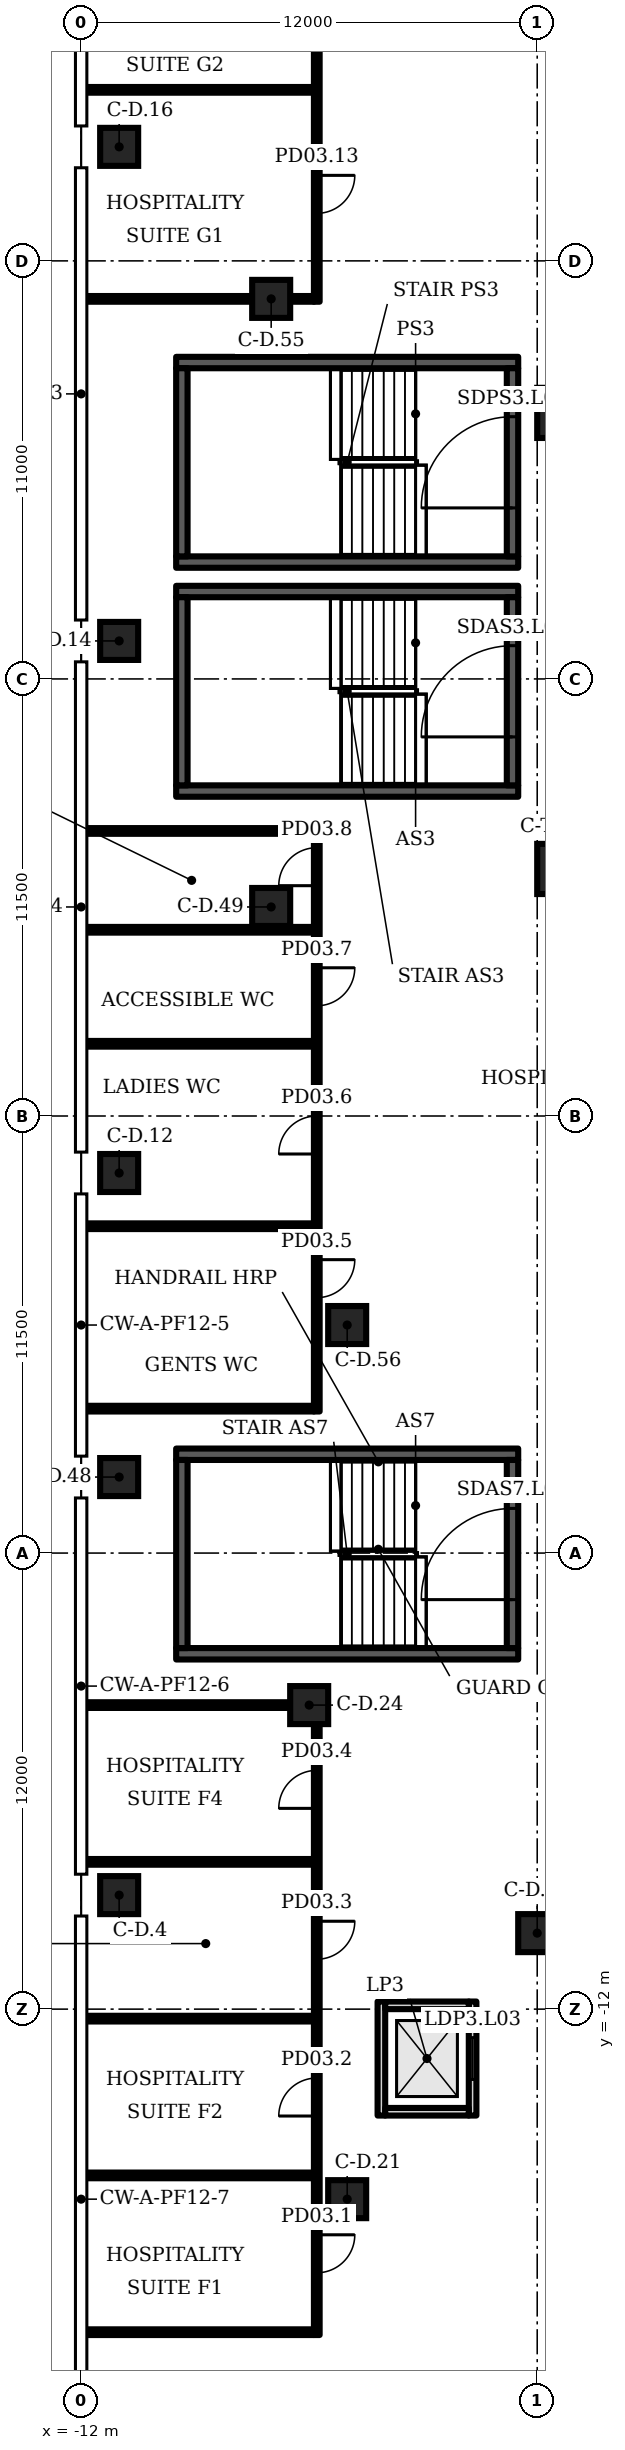
"""IFC4 building model, lengths in metres.
Left out: names, types, materials, properties, quantities, classifications, styles, units other than length and angle.
Written with IfcOpenShell. Run it as: python <this file> out.ifc"""

import sys

from ifc_helpers import new_model, si_unit, direction, frame, frame_2d, origin, origin_2d, place, context, subcontext, project, spatial, rectangle, extrude, element, fill, save


model = new_model("IFC4")
c1 = context("Model", 3, precision=1e-05, world=origin(), true_north=direction((0.0, 1.0)))
c2 = subcontext(c1, "Body", "Model", "MODEL_VIEW")
j1 = project(units=[si_unit("LENGTHUNIT", "METRE"), si_unit("PLANEANGLEUNIT", "RADIAN")], contexts=[c1])
p1 = place(None, origin())
s1 = spatial("IfcSite", under=j1, at=p1, CompositionType="ELEMENT")
p2 = place(p1, origin())
s2 = spatial("IfcBuilding", under=s1, at=p2, CompositionType="ELEMENT")
p3 = place(p2, frame((0.0, 0.0, 21.5)))
s3 = spatial("IfcBuildingStorey", under=s2, at=p3, CompositionType="ELEMENT", Elevation=21.5)
for number, where, z_axis, x_axis in (
    (1, (0.66, 30.0, 0.0), (0.0, 0.0, 1.0), (1.0, 0.0, 0.0)),
    (2, (0.66, 18.0, 0.0), (0.0, 0.0, 1.0), (1.0, 0.0, 0.0)),
):
    element("IfcColumn", number, at=place(p3, frame(where, z_axis=z_axis, x_axis=x_axis)), inside=s3, PredefinedType="COLUMN", context=c2, shape_type="SweptSolid", body=[
        extrude(rectangle(XDim=1.32, YDim=1.32, at=origin_2d()), origin(), (0.0, 0.0, 1.0), 6.0),
    ])
for number, where, z_axis, x_axis in (
    (3, (-11.0, -9.0, 0.0), (0.0, 0.0, 1.0), (1.0, 0.0, 0.0)),
    (4, (-11.0, 10.0, 0.0), (0.0, 0.0, 1.0), (1.0, 0.0, 0.0)),
    (5, (-11.0, 24.0, 0.0), (0.0, 0.0, 1.0), (1.0, 0.0, 0.0)),
    (6, (-11.0, 37.0, 0.0), (0.0, 0.0, 1.0), (1.0, 0.0, 0.0)),
    (7, (-5.0, -17.0, 0.0), (0.0, 0.0, 1.0), (1.0, 0.0, 0.0)),
    (8, (-6.0, -4.0, 0.0), (0.0, 0.0, 1.0), (1.0, 0.0, 0.0)),
    (9, (0.0, -10.0, 0.0), (0.0, 0.0, 1.0), (1.0, 0.0, 0.0)),
    (10, (-11.0, 2.0, 0.0), (0.0, 0.0, 1.0), (1.0, 0.0, 0.0)),
    (11, (-7.0, 17.0, 0.0), (0.0, 0.0, 1.0), (1.0, 0.0, 0.0)),
    (12, (-7.0, 33.0, 0.0), (0.0, 0.0, 1.0), (1.0, 0.0, 0.0)),
    (13, (-5.0, 6.0, 0.0), (0.0, 0.0, 1.0), (1.0, 0.0, 0.0)),
):
    element("IfcColumn", number, at=place(p3, frame(where, z_axis=z_axis, x_axis=x_axis)), inside=s3, PredefinedType="COLUMN", context=c2, shape_type="SweptSolid", body=[
        extrude(rectangle(XDim=1.0, YDim=1.0, at=origin_2d()), origin(), (0.0, 0.0, 1.0), 6.0),
    ])
p4 = place(p3, frame((-11.895, -20.5, 0.0), z_axis=(0.0, 0.0, 1.0), x_axis=(1.0, 0.0, 0.0)))
e14 = element("IfcWall", 14, at=p4, inside=s3, PredefinedType="PARTITIONING", context=c2, shape_type="SweptSolid", body=[
    extrude(rectangle(XDim=6.02, YDim=0.15, at=frame_2d((3.01, 0.0))), origin(), (0.0, 0.0, 1.0), 5.7),
])
p5 = place(p3, frame((-5.8, -20.575, 0.0), z_axis=(0.0, 0.0, 1.0), x_axis=(0.0, 1.0, 0.0)))
e15 = element("IfcWall", 15, at=p5, inside=s3, PredefinedType="PARTITIONING", context=c2, shape_type="SweptSolid", body=[
    extrude(rectangle(XDim=16.065, YDim=0.15, at=frame_2d((8.032, 0.0))), origin(), (0.0, 0.0, 1.0), 5.7),
])
p6 = place(p5, frame((1.637, 0.0, 0.0)))
e16 = element("IfcOpeningElement", 16, at=p6, cuts=e15, PredefinedType="OPENING", context=c2, shape_type="SweptSolid", body=[
    extrude(rectangle(XDim=1.0, YDim=2.1, at=frame_2d((0.5, 1.05))), frame((0.0, 0.085, 0.0), z_axis=(0.0, -1.0, 0.0), x_axis=(1.0, 0.0, 0.0)), (0.0, 0.0, 1.0), 0.17),
])
p7 = place(p5, frame((5.762, 0.0, 0.0)))
e17 = element("IfcOpeningElement", 17, at=p7, cuts=e15, PredefinedType="OPENING", context=c2, shape_type="SweptSolid", body=[
    extrude(rectangle(XDim=1.0, YDim=2.1, at=frame_2d((0.5, 1.05))), frame((0.0, 0.085, 0.0), z_axis=(0.0, -1.0, 0.0), x_axis=(1.0, 0.0, 0.0)), (0.0, 0.0, 1.0), 0.17),
])
p8 = place(p5, frame((9.887, 0.0, 0.0)))
e18 = element("IfcOpeningElement", 18, at=p8, cuts=e15, PredefinedType="OPENING", context=c2, shape_type="SweptSolid", body=[
    extrude(rectangle(XDim=1.0, YDim=2.1, at=frame_2d((0.5, 1.05))), frame((0.0, 0.085, 0.0), z_axis=(0.0, -1.0, 0.0), x_axis=(1.0, 0.0, 0.0)), (0.0, 0.0, 1.0), 0.17),
])
p9 = place(p5, frame((13.857, 0.0, 0.0)))
e19 = element("IfcOpeningElement", 19, at=p9, cuts=e15, PredefinedType="OPENING", context=c2, shape_type="SweptSolid", body=[
    extrude(rectangle(XDim=1.0, YDim=2.1, at=frame_2d((0.5, 1.05))), frame((0.0, 0.085, 0.0), z_axis=(0.0, -1.0, 0.0), x_axis=(1.0, 0.0, 0.0)), (0.0, 0.0, 1.0), 0.17),
])
p10 = place(p3, frame((-5.8, 3.725, 0.0), z_axis=(0.0, 0.0, 1.0), x_axis=(0.0, 1.0, 0.0)))
e20 = element("IfcWall", 20, at=p10, inside=s3, PredefinedType="PARTITIONING", context=c2, shape_type="SweptSolid", body=[
    extrude(rectangle(XDim=15.35, YDim=0.15, at=frame_2d((7.675, 0.0))), origin(), (0.0, 0.0, 1.0), 5.7),
])
p11 = place(p10, frame((2.995, 0.0, 0.0)))
e21 = element("IfcOpeningElement", 21, at=p11, cuts=e20, PredefinedType="OPENING", context=c2, shape_type="SweptSolid", body=[
    extrude(rectangle(XDim=1.0, YDim=2.1, at=frame_2d((0.5, 1.05))), frame((0.0, 0.085, 0.0), z_axis=(0.0, -1.0, 0.0), x_axis=(1.0, 0.0, 0.0)), (0.0, 0.0, 1.0), 0.17),
])
p12 = place(p10, frame((6.775, 0.0, 0.0)))
e22 = element("IfcOpeningElement", 22, at=p12, cuts=e20, PredefinedType="OPENING", context=c2, shape_type="SweptSolid", body=[
    extrude(rectangle(XDim=1.0, YDim=2.1, at=frame_2d((0.5, 1.05))), frame((0.0, 0.085, 0.0), z_axis=(0.0, -1.0, 0.0), x_axis=(1.0, 0.0, 0.0)), (0.0, 0.0, 1.0), 0.17),
])
p13 = place(p10, frame((10.675, 0.0, 0.0)))
e23 = element("IfcOpeningElement", 23, at=p13, cuts=e20, PredefinedType="OPENING", context=c2, shape_type="SweptSolid", body=[
    extrude(rectangle(XDim=1.0, YDim=2.1, at=frame_2d((0.5, 1.05))), frame((0.0, 0.085, 0.0), z_axis=(0.0, -1.0, 0.0), x_axis=(1.0, 0.0, 0.0)), (0.0, 0.0, 1.0), 0.17),
])
p14 = place(p10, frame((13.835, 0.0, 0.0)))
e24 = element("IfcOpeningElement", 24, at=p14, cuts=e20, PredefinedType="OPENING", context=c2, shape_type="SweptSolid", body=[
    extrude(rectangle(XDim=1.0, YDim=2.1, at=frame_2d((0.5, 1.05))), frame((0.0, 0.085, 0.0), z_axis=(0.0, -1.0, 0.0), x_axis=(1.0, 0.0, 0.0)), (0.0, 0.0, 1.0), 0.17),
])
p15 = place(p3, frame((-5.8, 32.925, 0.0), z_axis=(0.0, 0.0, 1.0), x_axis=(0.0, 1.0, 0.0)))
e25 = element("IfcWall", 25, at=p15, inside=s3, PredefinedType="PARTITIONING", context=c2, shape_type="SweptSolid", body=[
    extrude(rectangle(XDim=16.65, YDim=0.15, at=frame_2d((8.325, 0.0))), origin(), (0.0, 0.0, 1.0), 5.7),
])
p16 = place(p15, frame((2.325, 0.0, 0.0)))
e26 = element("IfcOpeningElement", 26, at=p16, cuts=e25, PredefinedType="OPENING", context=c2, shape_type="SweptSolid", body=[
    extrude(rectangle(XDim=1.0, YDim=2.1, at=frame_2d((0.5, 1.05))), frame((0.0, 0.085, 0.0), z_axis=(0.0, -1.0, 0.0), x_axis=(1.0, 0.0, 0.0)), (0.0, 0.0, 1.0), 0.17),
])
p17 = place(p15, frame((7.825, 0.0, 0.0)))
e27 = element("IfcOpeningElement", 27, at=p17, cuts=e25, PredefinedType="OPENING", context=c2, shape_type="SweptSolid", body=[
    extrude(rectangle(XDim=1.0, YDim=2.1, at=frame_2d((0.5, 1.05))), frame((0.0, 0.085, 0.0), z_axis=(0.0, -1.0, 0.0), x_axis=(1.0, 0.0, 0.0)), (0.0, 0.0, 1.0), 0.17),
])
p18 = place(p15, frame((13.325, 0.0, 0.0)))
e28 = element("IfcOpeningElement", 28, at=p18, cuts=e25, PredefinedType="OPENING", context=c2, shape_type="SweptSolid", body=[
    extrude(rectangle(XDim=1.0, YDim=2.1, at=frame_2d((0.5, 1.05))), frame((0.0, 0.085, 0.0), z_axis=(0.0, -1.0, 0.0), x_axis=(1.0, 0.0, 0.0)), (0.0, 0.0, 1.0), 0.17),
])
for number, where, z_axis, x_axis in (
    (29, (-11.895, -16.375, 0.0), (0.0, 0.0, 1.0), (1.0, 0.0, 0.0)),
    (30, (-11.895, -12.25, 0.0), (0.0, 0.0, 1.0), (1.0, 0.0, 0.0)),
    (31, (-11.895, -8.125, 0.0), (0.0, 0.0, 1.0), (1.0, 0.0, 0.0)),
):
    element("IfcWall", number, at=place(p3, frame(where, z_axis=z_axis, x_axis=x_axis)), inside=s3, PredefinedType="PARTITIONING", context=c2, shape_type="SweptSolid", body=[
        extrude(rectangle(XDim=6.02, YDim=0.15, at=frame_2d((3.01, 0.0))), origin(), (0.0, 0.0, 1.0), 5.7),
    ])
p19 = place(p3, frame((-11.895, -4.0, 0.0), z_axis=(0.0, 0.0, 1.0), x_axis=(1.0, 0.0, 0.0)))
e32 = element("IfcWall", 32, at=p19, inside=s3, PredefinedType="PARTITIONING", context=c2, shape_type="SweptSolid", body=[
    extrude(rectangle(XDim=5.385, YDim=0.15, at=frame_2d((2.692, 0.0))), origin(), (0.0, 0.0, 1.0), 5.7),
])
for number, where, z_axis, x_axis in (
    (33, (-11.895, 3.8, 0.0), (0.0, 0.0, 1.0), (1.0, 0.0, 0.0)),
    (34, (-11.895, 8.6, 0.0), (0.0, 0.0, 1.0), (1.0, 0.0, 0.0)),
    (35, (-11.895, 13.4, 0.0), (0.0, 0.0, 1.0), (1.0, 0.0, 0.0)),
    (36, (-11.895, 16.4, 0.0), (0.0, 0.0, 1.0), (1.0, 0.0, 0.0)),
    (37, (-11.895, 19.0, 0.0), (0.0, 0.0, 1.0), (1.0, 0.0, 0.0)),
):
    element("IfcWall", number, at=place(p3, frame(where, z_axis=z_axis, x_axis=x_axis)), inside=s3, PredefinedType="PARTITIONING", context=c2, shape_type="SweptSolid", body=[
        extrude(rectangle(XDim=6.02, YDim=0.15, at=frame_2d((3.01, 0.0))), origin(), (0.0, 0.0, 1.0), 5.7),
    ])
p20 = place(p3, frame((-11.895, 33.0, 0.0), z_axis=(0.0, 0.0, 1.0), x_axis=(1.0, 0.0, 0.0)))
e38 = element("IfcWall", 38, at=p20, inside=s3, PredefinedType="PARTITIONING", context=c2, shape_type="SweptSolid", body=[
    extrude(rectangle(XDim=4.385, YDim=0.15, at=frame_2d((2.192, 0.0))), origin(), (0.0, 0.0, 1.0), 5.7),
])
p21 = place(p3, frame((-6.49, 33.0, 0.0), z_axis=(0.0, 0.0, 1.0), x_axis=(1.0, 0.0, 0.0)))
e39 = element("IfcWall", 39, at=p21, inside=s3, PredefinedType="PARTITIONING", context=c2, shape_type="SweptSolid", body=[
    extrude(rectangle(XDim=0.615, YDim=0.15, at=frame_2d((0.308, 0.0))), origin(), (0.0, 0.0, 1.0), 5.7),
])
p22 = place(p3, frame((-11.895, 38.5, 0.0), z_axis=(0.0, 0.0, 1.0), x_axis=(1.0, 0.0, 0.0)))
e40 = element("IfcWall", 40, at=p22, inside=s3, PredefinedType="PARTITIONING", context=c2, shape_type="SweptSolid", body=[
    extrude(rectangle(XDim=6.02, YDim=0.15, at=frame_2d((3.01, 0.0))), origin(), (0.0, 0.0, 1.0), 5.7),
])
for number, where, z_axis, x_axis in (
    (41, (-9.5, -2.65, 0.0), (0.0, 0.0, 1.0), (1.0, 0.0, 0.0)),
    (42, (-9.5, 2.6, 0.0), (0.0, 0.0, 1.0), (1.0, 0.0, 0.0)),
):
    element("IfcWall", number, at=place(p3, frame(where, z_axis=z_axis, x_axis=x_axis)), inside=s3, PredefinedType="SHEAR", context=c2, shape_type="SweptSolid", body=[
        extrude(rectangle(XDim=9.0, YDim=0.3, at=frame_2d((4.5, 0.0))), origin(), (0.0, 0.0, 1.0), 5.7),
    ])
p23 = place(p3, frame((-9.35, -2.5, 0.0), z_axis=(0.0, 0.0, 1.0), x_axis=(0.0, 1.0, 0.0)))
e43 = element("IfcWall", 43, at=p23, inside=s3, PredefinedType="SHEAR", context=c2, shape_type="SweptSolid", body=[
    extrude(rectangle(XDim=4.95, YDim=0.3, at=frame_2d((2.475, 0.0))), origin(), (0.0, 0.0, 1.0), 5.7),
])
p24 = place(p3, frame((-0.65, -2.5, 0.0), z_axis=(0.0, 0.0, 1.0), x_axis=(0.0, 1.0, 0.0)))
e44 = element("IfcWall", 44, at=p24, inside=s3, PredefinedType="SHEAR", context=c2, shape_type="SweptSolid", body=[
    extrude(rectangle(XDim=4.95, YDim=0.3, at=frame_2d((2.475, 0.0))), origin(), (0.0, 0.0, 1.0), 5.7),
])
p25 = place(p24, frame((1.275, 0.0, 0.0)))
e45 = element("IfcOpeningElement", 45, at=p25, cuts=e44, PredefinedType="OPENING", context=c2, shape_type="SweptSolid", body=[
    extrude(rectangle(XDim=2.4, YDim=2.1, at=frame_2d((1.2, 1.05))), frame((0.0, 0.16, 0.0), z_axis=(0.0, -1.0, 0.0), x_axis=(1.0, 0.0, 0.0)), (0.0, 0.0, 1.0), 0.32),
])
for number, where, z_axis, x_axis in (
    (46, (-9.5, 20.05, 0.0), (0.0, 0.0, 1.0), (1.0, 0.0, 0.0)),
    (47, (-9.5, 25.3, 0.0), (0.0, 0.0, 1.0), (1.0, 0.0, 0.0)),
):
    element("IfcWall", number, at=place(p3, frame(where, z_axis=z_axis, x_axis=x_axis)), inside=s3, PredefinedType="SHEAR", context=c2, shape_type="SweptSolid", body=[
        extrude(rectangle(XDim=9.0, YDim=0.3, at=frame_2d((4.5, 0.0))), origin(), (0.0, 0.0, 1.0), 5.7),
    ])
p26 = place(p3, frame((-9.35, 20.2, 0.0), z_axis=(0.0, 0.0, 1.0), x_axis=(0.0, 1.0, 0.0)))
e48 = element("IfcWall", 48, at=p26, inside=s3, PredefinedType="SHEAR", context=c2, shape_type="SweptSolid", body=[
    extrude(rectangle(XDim=4.95, YDim=0.3, at=frame_2d((2.475, 0.0))), origin(), (0.0, 0.0, 1.0), 5.7),
])
p27 = place(p3, frame((-0.65, 20.2, 0.0), z_axis=(0.0, 0.0, 1.0), x_axis=(0.0, 1.0, 0.0)))
e49 = element("IfcWall", 49, at=p27, inside=s3, PredefinedType="SHEAR", context=c2, shape_type="SweptSolid", body=[
    extrude(rectangle(XDim=4.95, YDim=0.3, at=frame_2d((2.475, 0.0))), origin(), (0.0, 0.0, 1.0), 5.7),
])
p28 = place(p27, frame((1.275, 0.0, 0.0)))
e50 = element("IfcOpeningElement", 50, at=p28, cuts=e49, PredefinedType="OPENING", context=c2, shape_type="SweptSolid", body=[
    extrude(rectangle(XDim=2.4, YDim=2.1, at=frame_2d((1.2, 1.05))), frame((0.0, 0.16, 0.0), z_axis=(0.0, -1.0, 0.0), x_axis=(1.0, 0.0, 0.0)), (0.0, 0.0, 1.0), 0.32),
])
for number, where, z_axis, x_axis in (
    (51, (-9.5, 26.075, 0.0), (0.0, 0.0, 1.0), (1.0, 0.0, 0.0)),
    (52, (-9.5, 31.325, 0.0), (0.0, 0.0, 1.0), (1.0, 0.0, 0.0)),
):
    element("IfcWall", number, at=place(p3, frame(where, z_axis=z_axis, x_axis=x_axis)), inside=s3, PredefinedType="SHEAR", context=c2, shape_type="SweptSolid", body=[
        extrude(rectangle(XDim=9.0, YDim=0.3, at=frame_2d((4.5, 0.0))), origin(), (0.0, 0.0, 1.0), 5.7),
    ])
p29 = place(p3, frame((-9.35, 26.225, 0.0), z_axis=(0.0, 0.0, 1.0), x_axis=(0.0, 1.0, 0.0)))
e53 = element("IfcWall", 53, at=p29, inside=s3, PredefinedType="SHEAR", context=c2, shape_type="SweptSolid", body=[
    extrude(rectangle(XDim=4.95, YDim=0.3, at=frame_2d((2.475, 0.0))), origin(), (0.0, 0.0, 1.0), 5.7),
])
p30 = place(p3, frame((-0.65, 26.225, 0.0), z_axis=(0.0, 0.0, 1.0), x_axis=(0.0, 1.0, 0.0)))
e54 = element("IfcWall", 54, at=p30, inside=s3, PredefinedType="SHEAR", context=c2, shape_type="SweptSolid", body=[
    extrude(rectangle(XDim=4.95, YDim=0.3, at=frame_2d((2.475, 0.0))), origin(), (0.0, 0.0, 1.0), 5.7),
])
p31 = place(p30, frame((1.275, 0.0, 0.0)))
e55 = element("IfcOpeningElement", 55, at=p31, cuts=e54, PredefinedType="OPENING", context=c2, shape_type="SweptSolid", body=[
    extrude(rectangle(XDim=2.4, YDim=2.1, at=frame_2d((1.2, 1.05))), frame((0.0, 0.16, 0.0), z_axis=(0.0, -1.0, 0.0), x_axis=(1.0, 0.0, 0.0)), (0.0, 0.0, 1.0), 0.32),
])
p32 = place(p3, frame((-4.1, -14.8, 0.0), z_axis=(0.0, 0.0, 1.0), x_axis=(0.0, 1.0, 0.0)))
e56 = element("IfcWall", 56, at=p32, inside=s3, PredefinedType="PARTITIONING", context=c2, shape_type="SweptSolid", body=[
    extrude(rectangle(XDim=3.0, YDim=0.2, at=frame_2d((1.5, 0.0))), origin(), (0.0, 0.0, 1.0), 5.7),
])
p33 = place(p3, frame((-1.7, -14.8, 0.0), z_axis=(0.0, 0.0, 1.0), x_axis=(0.0, 1.0, 0.0)))
e57 = element("IfcWall", 57, at=p33, inside=s3, PredefinedType="PARTITIONING", context=c2, shape_type="SweptSolid", body=[
    extrude(rectangle(XDim=3.0, YDim=0.2, at=frame_2d((1.5, 0.0))), origin(), (0.0, 0.0, 1.0), 5.7),
])
p34 = place(p33, frame((0.95, 0.0, 0.0)))
e58 = element("IfcOpeningElement", 58, at=p34, cuts=e57, PredefinedType="OPENING", context=c2, shape_type="SweptSolid", body=[
    extrude(rectangle(XDim=1.1, YDim=2.1, at=frame_2d((0.55, 1.05))), frame((0.0, 0.11, 0.0), z_axis=(0.0, -1.0, 0.0), x_axis=(1.0, 0.0, 0.0)), (0.0, 0.0, 1.0), 0.22),
])
for number, where, z_axis, x_axis in (
    (59, (-4.0, -14.7, 0.0), (0.0, 0.0, 1.0), (1.0, 0.0, 0.0)),
    (60, (-4.0, -11.9, 0.0), (0.0, 0.0, 1.0), (1.0, 0.0, 0.0)),
):
    element("IfcWall", number, at=place(p3, frame(where, z_axis=z_axis, x_axis=x_axis)), inside=s3, PredefinedType="PARTITIONING", context=c2, shape_type="SweptSolid", body=[
        extrude(rectangle(XDim=2.2, YDim=0.2, at=frame_2d((1.1, 0.0))), origin(), (0.0, 0.0, 1.0), 5.7),
    ])
p35 = place(p6, origin())
e61 = element("IfcDoor", 61, at=p35, inside=s3, OperationType="SINGLE_SWING_RIGHT", PredefinedType="DOOR", context=c2, shape_type="SweptSolid", body=[
    extrude(rectangle(XDim=1.0, YDim=2.1, at=frame_2d((0.5, 1.05))), frame((0.0, 0.025, 0.0), z_axis=(0.0, -1.0, 0.0), x_axis=(1.0, 0.0, 0.0)), (0.0, 0.0, 1.0), 0.05),
])
fill(e16, e61)
p36 = place(p7, origin())
e62 = element("IfcDoor", 62, at=p36, inside=s3, OperationType="SINGLE_SWING_LEFT", PredefinedType="DOOR", context=c2, shape_type="SweptSolid", body=[
    extrude(rectangle(XDim=1.0, YDim=2.1, at=frame_2d((0.5, 1.05))), frame((0.0, 0.025, 0.0), z_axis=(0.0, -1.0, 0.0), x_axis=(1.0, 0.0, 0.0)), (0.0, 0.0, 1.0), 0.05),
])
fill(e17, e62)
p37 = place(p8, origin())
e63 = element("IfcDoor", 63, at=p37, inside=s3, OperationType="SINGLE_SWING_RIGHT", PredefinedType="DOOR", context=c2, shape_type="SweptSolid", body=[
    extrude(rectangle(XDim=1.0, YDim=2.1, at=frame_2d((0.5, 1.05))), frame((0.0, 0.025, 0.0), z_axis=(0.0, -1.0, 0.0), x_axis=(1.0, 0.0, 0.0)), (0.0, 0.0, 1.0), 0.05),
])
fill(e18, e63)
p38 = place(p9, origin())
e64 = element("IfcDoor", 64, at=p38, inside=s3, OperationType="SINGLE_SWING_LEFT", PredefinedType="DOOR", context=c2, shape_type="SweptSolid", body=[
    extrude(rectangle(XDim=1.0, YDim=2.1, at=frame_2d((0.5, 1.05))), frame((0.0, 0.025, 0.0), z_axis=(0.0, -1.0, 0.0), x_axis=(1.0, 0.0, 0.0)), (0.0, 0.0, 1.0), 0.05),
])
fill(e19, e64)
p39 = place(p11, origin())
e65 = element("IfcDoor", 65, at=p39, inside=s3, OperationType="SINGLE_SWING_RIGHT", PredefinedType="DOOR", context=c2, shape_type="SweptSolid", body=[
    extrude(rectangle(XDim=1.0, YDim=2.1, at=frame_2d((0.5, 1.05))), frame((0.0, 0.025, 0.0), z_axis=(0.0, -1.0, 0.0), x_axis=(1.0, 0.0, 0.0)), (0.0, 0.0, 1.0), 0.05),
])
fill(e21, e65)
p40 = place(p12, origin())
e66 = element("IfcDoor", 66, at=p40, inside=s3, OperationType="SINGLE_SWING_LEFT", PredefinedType="DOOR", context=c2, shape_type="SweptSolid", body=[
    extrude(rectangle(XDim=1.0, YDim=2.1, at=frame_2d((0.5, 1.05))), frame((0.0, 0.025, 0.0), z_axis=(0.0, -1.0, 0.0), x_axis=(1.0, 0.0, 0.0)), (0.0, 0.0, 1.0), 0.05),
])
fill(e22, e66)
p41 = place(p13, origin())
e67 = element("IfcDoor", 67, at=p41, inside=s3, OperationType="SINGLE_SWING_RIGHT", PredefinedType="DOOR", context=c2, shape_type="SweptSolid", body=[
    extrude(rectangle(XDim=1.0, YDim=2.1, at=frame_2d((0.5, 1.05))), frame((0.0, 0.025, 0.0), z_axis=(0.0, -1.0, 0.0), x_axis=(1.0, 0.0, 0.0)), (0.0, 0.0, 1.0), 0.05),
])
fill(e23, e67)
p42 = place(p14, origin())
e68 = element("IfcDoor", 68, at=p42, inside=s3, OperationType="SINGLE_SWING_LEFT", PredefinedType="DOOR", context=c2, shape_type="SweptSolid", body=[
    extrude(rectangle(XDim=1.0, YDim=2.1, at=frame_2d((0.5, 1.05))), frame((0.0, 0.025, 0.0), z_axis=(0.0, -1.0, 0.0), x_axis=(1.0, 0.0, 0.0)), (0.0, 0.0, 1.0), 0.05),
])
fill(e24, e68)
p43 = place(p16, origin())
e69 = element("IfcDoor", 69, at=p43, inside=s3, OperationType="SINGLE_SWING_RIGHT", PredefinedType="DOOR", context=c2, shape_type="SweptSolid", body=[
    extrude(rectangle(XDim=1.0, YDim=2.1, at=frame_2d((0.5, 1.05))), frame((0.0, 0.025, 0.0), z_axis=(0.0, -1.0, 0.0), x_axis=(1.0, 0.0, 0.0)), (0.0, 0.0, 1.0), 0.05),
])
fill(e26, e69)
p44 = place(p25, origin())
e70 = element("IfcDoor", 70, at=p44, inside=s3, OperationType="DOUBLE_DOOR_SINGLE_SWING", PredefinedType="DOOR", context=c2, shape_type="SweptSolid", body=[
    extrude(rectangle(XDim=2.4, YDim=2.1, at=frame_2d((1.2, 1.05))), frame((0.0, 0.025, 0.0), z_axis=(0.0, -1.0, 0.0), x_axis=(1.0, 0.0, 0.0)), (0.0, 0.0, 1.0), 0.05),
])
fill(e45, e70)
p45 = place(p28, origin())
e71 = element("IfcDoor", 71, at=p45, inside=s3, OperationType="DOUBLE_DOOR_SINGLE_SWING", PredefinedType="DOOR", context=c2, shape_type="SweptSolid", body=[
    extrude(rectangle(XDim=2.4, YDim=2.1, at=frame_2d((1.2, 1.05))), frame((0.0, 0.025, 0.0), z_axis=(0.0, -1.0, 0.0), x_axis=(1.0, 0.0, 0.0)), (0.0, 0.0, 1.0), 0.05),
])
fill(e50, e71)
p46 = place(p31, origin())
e72 = element("IfcDoor", 72, at=p46, inside=s3, OperationType="DOUBLE_DOOR_SINGLE_SWING", PredefinedType="DOOR", context=c2, shape_type="SweptSolid", body=[
    extrude(rectangle(XDim=2.4, YDim=2.1, at=frame_2d((1.2, 1.05))), frame((0.0, 0.025, 0.0), z_axis=(0.0, -1.0, 0.0), x_axis=(1.0, 0.0, 0.0)), (0.0, 0.0, 1.0), 0.05),
])
fill(e55, e72)
p47 = place(p34, origin())
e73 = element("IfcDoor", 73, at=p47, inside=s3, OperationType="DOUBLE_DOOR_SLIDING", PredefinedType="DOOR", context=c2, shape_type="SweptSolid", body=[
    extrude(rectangle(XDim=1.1, YDim=2.1, at=frame_2d((0.55, 1.05))), frame((0.0, 0.025, 0.0), z_axis=(0.0, -1.0, 0.0), x_axis=(1.0, 0.0, 0.0)), (0.0, 0.0, 1.0), 0.05),
])
fill(e58, e73)
save(model, sys.argv[1])
